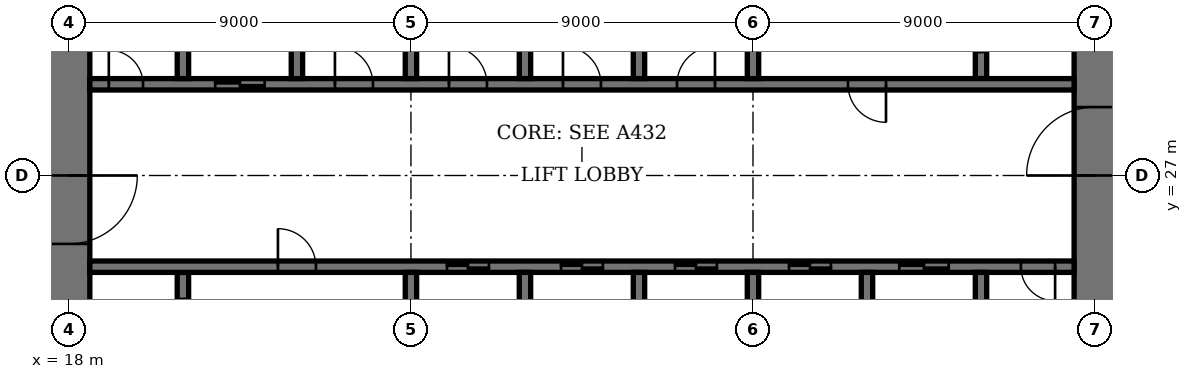
"""IFC4 building model, lengths in metres.
Left out: names, types, materials, properties, quantities, classifications, styles, units other than length and angle.
Written with IfcOpenShell. Run it as: python <this file> out.ifc"""

import sys

from ifc_helpers import new_model, si_unit, direction, frame, frame_2d, origin, place, context, subcontext, project, spatial, rectangle, extrude, element, fill, save


model = new_model("IFC4")
c1 = context("Model", 3, precision=1e-05, world=origin(), true_north=direction((0.0, 1.0)))
c2 = subcontext(c1, "Body", "Model", "MODEL_VIEW")
j1 = project(units=[si_unit("LENGTHUNIT", "METRE"), si_unit("PLANEANGLEUNIT", "RADIAN")], contexts=[c1])
p1 = place(None, origin())
s1 = spatial("IfcSite", under=j1, at=p1, CompositionType="ELEMENT")
p2 = place(p1, origin())
s2 = spatial("IfcBuilding", under=s1, at=p2, CompositionType="ELEMENT")
p3 = place(p2, frame((0.0, 0.0, 267.4)))
s3 = spatial("IfcBuildingStorey", under=s2, at=p3, CompositionType="ELEMENT", Elevation=267.4)
p4 = place(p3, frame((18.0, 35.45, 0.0), z_axis=(0.0, 0.0, 1.0), x_axis=(0.0, -1.0, 0.0)))
e1 = element("IfcWall", 1, at=p4, inside=s3, PredefinedType="SHEAR", context=c2, shape_type="SweptSolid", body=[
    extrude(rectangle(XDim=16.9, YDim=1.1, at=frame_2d((8.45, 0.0))), origin(), (0.0, 0.0, 1.0), 4.0),
])
p5 = place(p4, frame((8.45, 0.0, 0.0)))
e2 = element("IfcOpeningElement", 2, at=p5, cuts=e1, PredefinedType="OPENING", context=c2, shape_type="SweptSolid", body=[
    extrude(rectangle(XDim=1.8, YDim=2.4, at=frame_2d((0.9, 1.2))), frame((0.0, 0.56, 0.0), z_axis=(0.0, -1.0, 0.0), x_axis=(1.0, 0.0, 0.0)), (0.0, 0.0, 1.0), 1.12),
])
p6 = place(p3, frame((45.0, 18.55, 0.0), z_axis=(0.0, 0.0, 1.0), x_axis=(0.0, 1.0, 0.0)))
e3 = element("IfcWall", 3, at=p6, inside=s3, PredefinedType="SHEAR", context=c2, shape_type="SweptSolid", body=[
    extrude(rectangle(XDim=16.9, YDim=1.1, at=frame_2d((8.45, 0.0))), origin(), (0.0, 0.0, 1.0), 4.0),
])
p7 = place(p6, frame((8.45, 0.0, 0.0)))
e4 = element("IfcOpeningElement", 4, at=p7, cuts=e3, PredefinedType="OPENING", context=c2, shape_type="SweptSolid", body=[
    extrude(rectangle(XDim=1.8, YDim=2.4, at=frame_2d((0.9, 1.2))), frame((0.0, 0.56, 0.0), z_axis=(0.0, -1.0, 0.0), x_axis=(1.0, 0.0, 0.0)), (0.0, 0.0, 1.0), 1.12),
])
p8 = place(p3, frame((21.0, 21.95, 0.0), z_axis=(0.0, 0.0, 1.0), x_axis=(0.0, 1.0, 0.0)))
e5 = element("IfcWall", 5, at=p8, inside=s3, PredefinedType="SHEAR", context=c2, shape_type="SweptSolid", body=[
    extrude(rectangle(XDim=2.5, YDim=0.3, at=frame_2d((1.25, 0.0))), origin(), (0.0, 0.0, 1.0), 4.0),
])
p9 = place(p8, frame((0.7, 0.0, 0.0)))
e6 = element("IfcOpeningElement", 6, at=p9, cuts=e5, PredefinedType="OPENING", context=c2, shape_type="SweptSolid", body=[
    extrude(rectangle(XDim=1.1, YDim=2.4, at=frame_2d((0.55, 1.2))), frame((0.0, 0.16, 0.0), z_axis=(0.0, -1.0, 0.0), x_axis=(1.0, 0.0, 0.0)), (0.0, 0.0, 1.0), 0.32),
])
p10 = place(p3, frame((42.0, 29.55, 0.0), z_axis=(0.0, 0.0, 1.0), x_axis=(0.0, 1.0, 0.0)))
e7 = element("IfcWall", 7, at=p10, inside=s3, PredefinedType="SHEAR", context=c2, shape_type="SweptSolid", body=[
    extrude(rectangle(XDim=2.5, YDim=0.3, at=frame_2d((1.25, 0.0))), origin(), (0.0, 0.0, 1.0), 4.0),
])
p11 = place(p10, frame((0.7, 0.0, 0.0)))
e8 = element("IfcOpeningElement", 8, at=p11, cuts=e7, PredefinedType="OPENING", context=c2, shape_type="SweptSolid", body=[
    extrude(rectangle(XDim=1.1, YDim=2.4, at=frame_2d((0.55, 1.2))), frame((0.0, 0.16, 0.0), z_axis=(0.0, -1.0, 0.0), x_axis=(1.0, 0.0, 0.0)), (0.0, 0.0, 1.0), 0.32),
])
p12 = place(p3, frame((18.55, 24.6, 0.0), z_axis=(0.0, 0.0, 1.0), x_axis=(1.0, 0.0, 0.0)))
e9 = element("IfcWall", 9, at=p12, inside=s3, PredefinedType="SHEAR", context=c2, shape_type="SweptSolid", body=[
    extrude(rectangle(XDim=25.9, YDim=0.3, at=frame_2d((12.95, 0.0))), origin(), (0.0, 0.0, 1.0), 4.0),
])
p13 = place(p12, frame((4.95, 0.0, 0.0)))
e10 = element("IfcOpeningElement", 10, at=p13, cuts=e9, PredefinedType="OPENING", context=c2, shape_type="SweptSolid", body=[
    extrude(rectangle(XDim=1.0, YDim=2.4, at=frame_2d((0.5, 1.2))), frame((0.0, 0.16, 0.0), z_axis=(0.0, -1.0, 0.0), x_axis=(1.0, 0.0, 0.0)), (0.0, 0.0, 1.0), 0.32),
])
p14 = place(p12, frame((24.5, 0.0, 0.0)))
e11 = element("IfcOpeningElement", 11, at=p14, cuts=e9, PredefinedType="OPENING", context=c2, shape_type="SweptSolid", body=[
    extrude(rectangle(XDim=0.9, YDim=2.1, at=frame_2d((0.45, 1.05))), frame((0.0, 0.16, 0.0), z_axis=(0.0, -1.0, 0.0), x_axis=(1.0, 0.0, 0.0)), (0.0, 0.0, 1.0), 0.32),
])
p15 = place(p12, frame((9.4, 0.0, 0.0)))
e12 = element("IfcOpeningElement", 12, at=p15, cuts=e9, PredefinedType="OPENING", context=c2, shape_type="SweptSolid", body=[
    extrude(rectangle(XDim=1.1, YDim=2.4, at=frame_2d((0.55, 1.2))), frame((0.0, 0.16, 0.0), z_axis=(0.0, -1.0, 0.0), x_axis=(1.0, 0.0, 0.0)), (0.0, 0.0, 1.0), 0.32),
])
p16 = place(p12, frame((12.4, 0.0, 0.0)))
e13 = element("IfcOpeningElement", 13, at=p16, cuts=e9, PredefinedType="OPENING", context=c2, shape_type="SweptSolid", body=[
    extrude(rectangle(XDim=1.1, YDim=2.4, at=frame_2d((0.55, 1.2))), frame((0.0, 0.16, 0.0), z_axis=(0.0, -1.0, 0.0), x_axis=(1.0, 0.0, 0.0)), (0.0, 0.0, 1.0), 0.32),
])
p17 = place(p12, frame((15.4, 0.0, 0.0)))
e14 = element("IfcOpeningElement", 14, at=p17, cuts=e9, PredefinedType="OPENING", context=c2, shape_type="SweptSolid", body=[
    extrude(rectangle(XDim=1.1, YDim=2.4, at=frame_2d((0.55, 1.2))), frame((0.0, 0.16, 0.0), z_axis=(0.0, -1.0, 0.0), x_axis=(1.0, 0.0, 0.0)), (0.0, 0.0, 1.0), 0.32),
])
p18 = place(p12, frame((18.4, 0.0, 0.0)))
e15 = element("IfcOpeningElement", 15, at=p18, cuts=e9, PredefinedType="OPENING", context=c2, shape_type="SweptSolid", body=[
    extrude(rectangle(XDim=1.1, YDim=2.4, at=frame_2d((0.55, 1.2))), frame((0.0, 0.16, 0.0), z_axis=(0.0, -1.0, 0.0), x_axis=(1.0, 0.0, 0.0)), (0.0, 0.0, 1.0), 0.32),
])
p19 = place(p12, frame((21.3, 0.0, 0.0)))
e16 = element("IfcOpeningElement", 16, at=p19, cuts=e9, PredefinedType="OPENING", context=c2, shape_type="SweptSolid", body=[
    extrude(rectangle(XDim=1.3, YDim=2.4, at=frame_2d((0.65, 1.2))), frame((0.0, 0.16, 0.0), z_axis=(0.0, -1.0, 0.0), x_axis=(1.0, 0.0, 0.0)), (0.0, 0.0, 1.0), 0.32),
])
p20 = place(p3, frame((18.55, 29.4, 0.0), z_axis=(0.0, 0.0, 1.0), x_axis=(1.0, 0.0, 0.0)))
e17 = element("IfcWall", 17, at=p20, inside=s3, PredefinedType="SHEAR", context=c2, shape_type="SweptSolid", body=[
    extrude(rectangle(XDim=25.9, YDim=0.3, at=frame_2d((12.95, 0.0))), origin(), (0.0, 0.0, 1.0), 4.0),
])
p21 = place(p20, frame((19.95, 0.0, 0.0)))
e18 = element("IfcOpeningElement", 18, at=p21, cuts=e17, PredefinedType="OPENING", context=c2, shape_type="SweptSolid", body=[
    extrude(rectangle(XDim=1.0, YDim=2.4, at=frame_2d((0.5, 1.2))), frame((0.0, 0.16, 0.0), z_axis=(0.0, -1.0, 0.0), x_axis=(1.0, 0.0, 0.0)), (0.0, 0.0, 1.0), 0.32),
])
p22 = place(p20, frame((0.5, 0.0, 0.0)))
e19 = element("IfcOpeningElement", 19, at=p22, cuts=e17, PredefinedType="OPENING", context=c2, shape_type="SweptSolid", body=[
    extrude(rectangle(XDim=0.9, YDim=2.1, at=frame_2d((0.45, 1.05))), frame((0.0, 0.16, 0.0), z_axis=(0.0, -1.0, 0.0), x_axis=(1.0, 0.0, 0.0)), (0.0, 0.0, 1.0), 0.32),
])
p23 = place(p20, frame((15.45, 0.0, 0.0)))
e20 = element("IfcOpeningElement", 20, at=p23, cuts=e17, PredefinedType="OPENING", context=c2, shape_type="SweptSolid", body=[
    extrude(rectangle(XDim=1.0, YDim=2.4, at=frame_2d((0.5, 1.2))), frame((0.0, 0.16, 0.0), z_axis=(0.0, -1.0, 0.0), x_axis=(1.0, 0.0, 0.0)), (0.0, 0.0, 1.0), 0.32),
])
p24 = place(p20, frame((12.45, 0.0, 0.0)))
e21 = element("IfcOpeningElement", 21, at=p24, cuts=e17, PredefinedType="OPENING", context=c2, shape_type="SweptSolid", body=[
    extrude(rectangle(XDim=1.0, YDim=2.4, at=frame_2d((0.5, 1.2))), frame((0.0, 0.16, 0.0), z_axis=(0.0, -1.0, 0.0), x_axis=(1.0, 0.0, 0.0)), (0.0, 0.0, 1.0), 0.32),
])
p25 = place(p20, frame((9.45, 0.0, 0.0)))
e22 = element("IfcOpeningElement", 22, at=p25, cuts=e17, PredefinedType="OPENING", context=c2, shape_type="SweptSolid", body=[
    extrude(rectangle(XDim=1.0, YDim=2.4, at=frame_2d((0.5, 1.2))), frame((0.0, 0.16, 0.0), z_axis=(0.0, -1.0, 0.0), x_axis=(1.0, 0.0, 0.0)), (0.0, 0.0, 1.0), 0.32),
])
p26 = place(p20, frame((6.45, 0.0, 0.0)))
e23 = element("IfcOpeningElement", 23, at=p26, cuts=e17, PredefinedType="OPENING", context=c2, shape_type="SweptSolid", body=[
    extrude(rectangle(XDim=1.0, YDim=2.4, at=frame_2d((0.5, 1.2))), frame((0.0, 0.16, 0.0), z_axis=(0.0, -1.0, 0.0), x_axis=(1.0, 0.0, 0.0)), (0.0, 0.0, 1.0), 0.32),
])
p27 = place(p20, frame((3.3, 0.0, 0.0)))
e24 = element("IfcOpeningElement", 24, at=p27, cuts=e17, PredefinedType="OPENING", context=c2, shape_type="SweptSolid", body=[
    extrude(rectangle(XDim=1.3, YDim=2.4, at=frame_2d((0.65, 1.2))), frame((0.0, 0.16, 0.0), z_axis=(0.0, -1.0, 0.0), x_axis=(1.0, 0.0, 0.0)), (0.0, 0.0, 1.0), 0.32),
])
for number, where, z_axis, x_axis in (
    (25, (30.0, 21.75, 0.0), (0.0, 0.0, 1.0), (0.0, 1.0, 0.0)),
    (26, (33.0, 29.55, 0.0), (0.0, 0.0, 1.0), (0.0, 1.0, 0.0)),
    (27, (33.0, 21.75, 0.0), (0.0, 0.0, 1.0), (0.0, 1.0, 0.0)),
    (28, (30.0, 29.55, 0.0), (0.0, 0.0, 1.0), (0.0, 1.0, 0.0)),
    (29, (36.0, 21.75, 0.0), (0.0, 0.0, 1.0), (0.0, 1.0, 0.0)),
    (30, (27.0, 29.55, 0.0), (0.0, 0.0, 1.0), (0.0, 1.0, 0.0)),
):
    element("IfcWall", number, at=place(p3, frame(where, z_axis=z_axis, x_axis=x_axis)), inside=s3, PredefinedType="SHEAR", context=c2, shape_type="SweptSolid", body=[
        extrude(rectangle(XDim=2.7, YDim=0.3, at=frame_2d((1.35, 0.0))), origin(), (0.0, 0.0, 1.0), 4.0),
    ])
for number, where, z_axis, x_axis in (
    (31, (39.0, 18.55, 0.0), (0.0, 0.0, 1.0), (0.0, 1.0, 0.0)),
    (32, (24.0, 29.55, 0.0), (0.0, 0.0, 1.0), (0.0, 1.0, 0.0)),
):
    element("IfcWall", number, at=place(p3, frame(where, z_axis=z_axis, x_axis=x_axis)), inside=s3, PredefinedType="SHEAR", context=c2, shape_type="SweptSolid", body=[
        extrude(rectangle(XDim=5.9, YDim=0.3, at=frame_2d((2.95, 0.0))), origin(), (0.0, 0.0, 1.0), 4.0),
    ])
for number, where, z_axis, x_axis in (
    (33, (42.0, 21.75, 0.0), (0.0, 0.0, 1.0), (0.0, 1.0, 0.0)),
    (34, (21.0, 29.55, 0.0), (0.0, 0.0, 1.0), (0.0, 1.0, 0.0)),
):
    element("IfcWall", number, at=place(p3, frame(where, z_axis=z_axis, x_axis=x_axis)), inside=s3, PredefinedType="SHEAR", context=c2, shape_type="SweptSolid", body=[
        extrude(rectangle(XDim=2.7, YDim=0.3, at=frame_2d((1.35, 0.0))), origin(), (0.0, 0.0, 1.0), 4.0),
    ])
for number, where, z_axis, x_axis in (
    (35, (27.0, 21.6, 0.0), (0.0, 0.0, 1.0), (0.0, 1.0, 0.0)),
    (36, (36.0, 29.55, 0.0), (0.0, 0.0, 1.0), (0.0, 1.0, 0.0)),
):
    element("IfcWall", number, at=place(p3, frame(where, z_axis=z_axis, x_axis=x_axis)), inside=s3, PredefinedType="SHEAR", context=c2, shape_type="SweptSolid", body=[
        extrude(rectangle(XDim=2.85, YDim=0.3, at=frame_2d((1.425, 0.0))), origin(), (0.0, 0.0, 1.0), 4.0),
    ])
p28 = place(p5, origin())
e37 = element("IfcDoor", 37, at=p28, inside=s3, OperationType="DOUBLE_DOOR_DOUBLE_SWING", PredefinedType="DOOR", context=c2, shape_type="SweptSolid", body=[
    extrude(rectangle(XDim=1.8, YDim=2.4, at=frame_2d((0.9, 1.2))), frame((0.0, 0.03, 0.0), z_axis=(0.0, -1.0, 0.0), x_axis=(1.0, 0.0, 0.0)), (0.0, 0.0, 1.0), 0.06),
    extrude(rectangle(XDim=0.04, YDim=2.4, at=frame_2d((0.02, 1.2))), frame((0.0, 0.55, 0.0), z_axis=(0.0, -1.0, 0.0), x_axis=(1.0, 0.0, 0.0)), (0.0, 0.0, 1.0), 1.1),
    extrude(rectangle(XDim=0.04, YDim=2.4, at=frame_2d((1.78, 1.2))), frame((0.0, 0.55, 0.0), z_axis=(0.0, -1.0, 0.0), x_axis=(1.0, 0.0, 0.0)), (0.0, 0.0, 1.0), 1.1),
    extrude(rectangle(XDim=1.8, YDim=0.04, at=frame_2d((0.9, 2.38))), frame((0.0, 0.55, 0.0), z_axis=(0.0, -1.0, 0.0), x_axis=(1.0, 0.0, 0.0)), (0.0, 0.0, 1.0), 1.1),
])
fill(e2, e37)
p29 = place(p7, origin())
e38 = element("IfcDoor", 38, at=p29, inside=s3, OperationType="DOUBLE_DOOR_DOUBLE_SWING", PredefinedType="DOOR", context=c2, shape_type="SweptSolid", body=[
    extrude(rectangle(XDim=1.8, YDim=2.4, at=frame_2d((0.9, 1.2))), frame((0.0, 0.03, 0.0), z_axis=(0.0, -1.0, 0.0), x_axis=(1.0, 0.0, 0.0)), (0.0, 0.0, 1.0), 0.06),
    extrude(rectangle(XDim=0.04, YDim=2.4, at=frame_2d((0.02, 1.2))), frame((0.0, 0.55, 0.0), z_axis=(0.0, -1.0, 0.0), x_axis=(1.0, 0.0, 0.0)), (0.0, 0.0, 1.0), 1.1),
    extrude(rectangle(XDim=0.04, YDim=2.4, at=frame_2d((1.78, 1.2))), frame((0.0, 0.55, 0.0), z_axis=(0.0, -1.0, 0.0), x_axis=(1.0, 0.0, 0.0)), (0.0, 0.0, 1.0), 1.1),
    extrude(rectangle(XDim=1.8, YDim=0.04, at=frame_2d((0.9, 2.38))), frame((0.0, 0.55, 0.0), z_axis=(0.0, -1.0, 0.0), x_axis=(1.0, 0.0, 0.0)), (0.0, 0.0, 1.0), 1.1),
])
fill(e4, e38)
p30 = place(p13, origin())
e39 = element("IfcDoor", 39, at=p30, inside=s3, OperationType="SINGLE_SWING_RIGHT", PredefinedType="DOOR", context=c2, shape_type="SweptSolid", body=[
    extrude(rectangle(XDim=1.0, YDim=2.4, at=frame_2d((0.5, 1.2))), frame((0.0, 0.03, 0.0), z_axis=(0.0, -1.0, 0.0), x_axis=(1.0, 0.0, 0.0)), (0.0, 0.0, 1.0), 0.06),
])
fill(e10, e39)
p31 = place(p21, origin())
e40 = element("IfcDoor", 40, at=p31, inside=s3, OperationType="SINGLE_SWING_RIGHT", PredefinedType="DOOR", context=c2, shape_type="SweptSolid", body=[
    extrude(rectangle(XDim=1.0, YDim=2.4, at=frame_2d((0.5, 1.2))), frame((0.0, 0.03, 0.0), z_axis=(0.0, -1.0, 0.0), x_axis=(1.0, 0.0, 0.0)), (0.0, 0.0, 1.0), 0.06),
])
fill(e18, e40)
p32 = place(p14, origin())
e41 = element("IfcDoor", 41, at=p32, inside=s3, OperationType="SINGLE_SWING_RIGHT", PredefinedType="DOOR", context=c2, shape_type="SweptSolid", body=[
    extrude(rectangle(XDim=0.9, YDim=2.1, at=frame_2d((0.45, 1.05))), frame((0.0, 0.03, 0.0), z_axis=(0.0, -1.0, 0.0), x_axis=(1.0, 0.0, 0.0)), (0.0, 0.0, 1.0), 0.06),
])
fill(e11, e41)
p33 = place(p22, origin())
e42 = element("IfcDoor", 42, at=p33, inside=s3, OperationType="SINGLE_SWING_RIGHT", PredefinedType="DOOR", context=c2, shape_type="SweptSolid", body=[
    extrude(rectangle(XDim=0.9, YDim=2.1, at=frame_2d((0.45, 1.05))), frame((0.0, 0.03, 0.0), z_axis=(0.0, -1.0, 0.0), x_axis=(1.0, 0.0, 0.0)), (0.0, 0.0, 1.0), 0.06),
])
fill(e19, e42)
p34 = place(p15, origin())
e43 = element("IfcDoor", 43, at=p34, inside=s3, OperationType="DOUBLE_DOOR_SLIDING", PredefinedType="DOOR", context=c2, shape_type="SweptSolid", body=[
    extrude(rectangle(XDim=1.1, YDim=2.4, at=frame_2d((0.55, 1.2))), frame((0.0, 0.02, 0.0), z_axis=(0.0, -1.0, 0.0), x_axis=(1.0, 0.0, 0.0)), (0.0, 0.0, 1.0), 0.04),
])
fill(e12, e43)
p35 = place(p16, origin())
e44 = element("IfcDoor", 44, at=p35, inside=s3, OperationType="DOUBLE_DOOR_SLIDING", PredefinedType="DOOR", context=c2, shape_type="SweptSolid", body=[
    extrude(rectangle(XDim=1.1, YDim=2.4, at=frame_2d((0.55, 1.2))), frame((0.0, 0.02, 0.0), z_axis=(0.0, -1.0, 0.0), x_axis=(1.0, 0.0, 0.0)), (0.0, 0.0, 1.0), 0.04),
])
fill(e13, e44)
p36 = place(p17, origin())
e45 = element("IfcDoor", 45, at=p36, inside=s3, OperationType="DOUBLE_DOOR_SLIDING", PredefinedType="DOOR", context=c2, shape_type="SweptSolid", body=[
    extrude(rectangle(XDim=1.1, YDim=2.4, at=frame_2d((0.55, 1.2))), frame((0.0, 0.02, 0.0), z_axis=(0.0, -1.0, 0.0), x_axis=(1.0, 0.0, 0.0)), (0.0, 0.0, 1.0), 0.04),
])
fill(e14, e45)
p37 = place(p18, origin())
e46 = element("IfcDoor", 46, at=p37, inside=s3, OperationType="DOUBLE_DOOR_SLIDING", PredefinedType="DOOR", context=c2, shape_type="SweptSolid", body=[
    extrude(rectangle(XDim=1.1, YDim=2.4, at=frame_2d((0.55, 1.2))), frame((0.0, 0.02, 0.0), z_axis=(0.0, -1.0, 0.0), x_axis=(1.0, 0.0, 0.0)), (0.0, 0.0, 1.0), 0.04),
])
fill(e15, e46)
p38 = place(p23, origin())
e47 = element("IfcDoor", 47, at=p38, inside=s3, OperationType="SINGLE_SWING_LEFT", PredefinedType="DOOR", context=c2, shape_type="SweptSolid", body=[
    extrude(rectangle(XDim=1.0, YDim=2.4, at=frame_2d((0.5, 1.2))), frame((0.0, 0.03, 0.0), z_axis=(0.0, -1.0, 0.0), x_axis=(1.0, 0.0, 0.0)), (0.0, 0.0, 1.0), 0.06),
])
fill(e20, e47)
p39 = place(p24, origin())
e48 = element("IfcDoor", 48, at=p39, inside=s3, OperationType="SINGLE_SWING_RIGHT", PredefinedType="DOOR", context=c2, shape_type="SweptSolid", body=[
    extrude(rectangle(XDim=1.0, YDim=2.4, at=frame_2d((0.5, 1.2))), frame((0.0, 0.03, 0.0), z_axis=(0.0, -1.0, 0.0), x_axis=(1.0, 0.0, 0.0)), (0.0, 0.0, 1.0), 0.06),
])
fill(e21, e48)
p40 = place(p25, origin())
e49 = element("IfcDoor", 49, at=p40, inside=s3, OperationType="SINGLE_SWING_RIGHT", PredefinedType="DOOR", context=c2, shape_type="SweptSolid", body=[
    extrude(rectangle(XDim=1.0, YDim=2.4, at=frame_2d((0.5, 1.2))), frame((0.0, 0.03, 0.0), z_axis=(0.0, -1.0, 0.0), x_axis=(1.0, 0.0, 0.0)), (0.0, 0.0, 1.0), 0.06),
])
fill(e22, e49)
p41 = place(p26, origin())
e50 = element("IfcDoor", 50, at=p41, inside=s3, OperationType="SINGLE_SWING_RIGHT", PredefinedType="DOOR", context=c2, shape_type="SweptSolid", body=[
    extrude(rectangle(XDim=1.0, YDim=2.4, at=frame_2d((0.5, 1.2))), frame((0.0, 0.03, 0.0), z_axis=(0.0, -1.0, 0.0), x_axis=(1.0, 0.0, 0.0)), (0.0, 0.0, 1.0), 0.06),
])
fill(e23, e50)
p42 = place(p19, origin())
e51 = element("IfcDoor", 51, at=p42, inside=s3, OperationType="DOUBLE_DOOR_SLIDING", PredefinedType="DOOR", context=c2, shape_type="SweptSolid", body=[
    extrude(rectangle(XDim=1.3, YDim=2.4, at=frame_2d((0.65, 1.2))), frame((0.0, 0.02, 0.0), z_axis=(0.0, -1.0, 0.0), x_axis=(1.0, 0.0, 0.0)), (0.0, 0.0, 1.0), 0.04),
])
fill(e16, e51)
p43 = place(p27, origin())
e52 = element("IfcDoor", 52, at=p43, inside=s3, OperationType="DOUBLE_DOOR_SLIDING", PredefinedType="DOOR", context=c2, shape_type="SweptSolid", body=[
    extrude(rectangle(XDim=1.3, YDim=2.4, at=frame_2d((0.65, 1.2))), frame((0.0, 0.02, 0.0), z_axis=(0.0, -1.0, 0.0), x_axis=(1.0, 0.0, 0.0)), (0.0, 0.0, 1.0), 0.04),
])
fill(e24, e52)
save(model, sys.argv[1])
